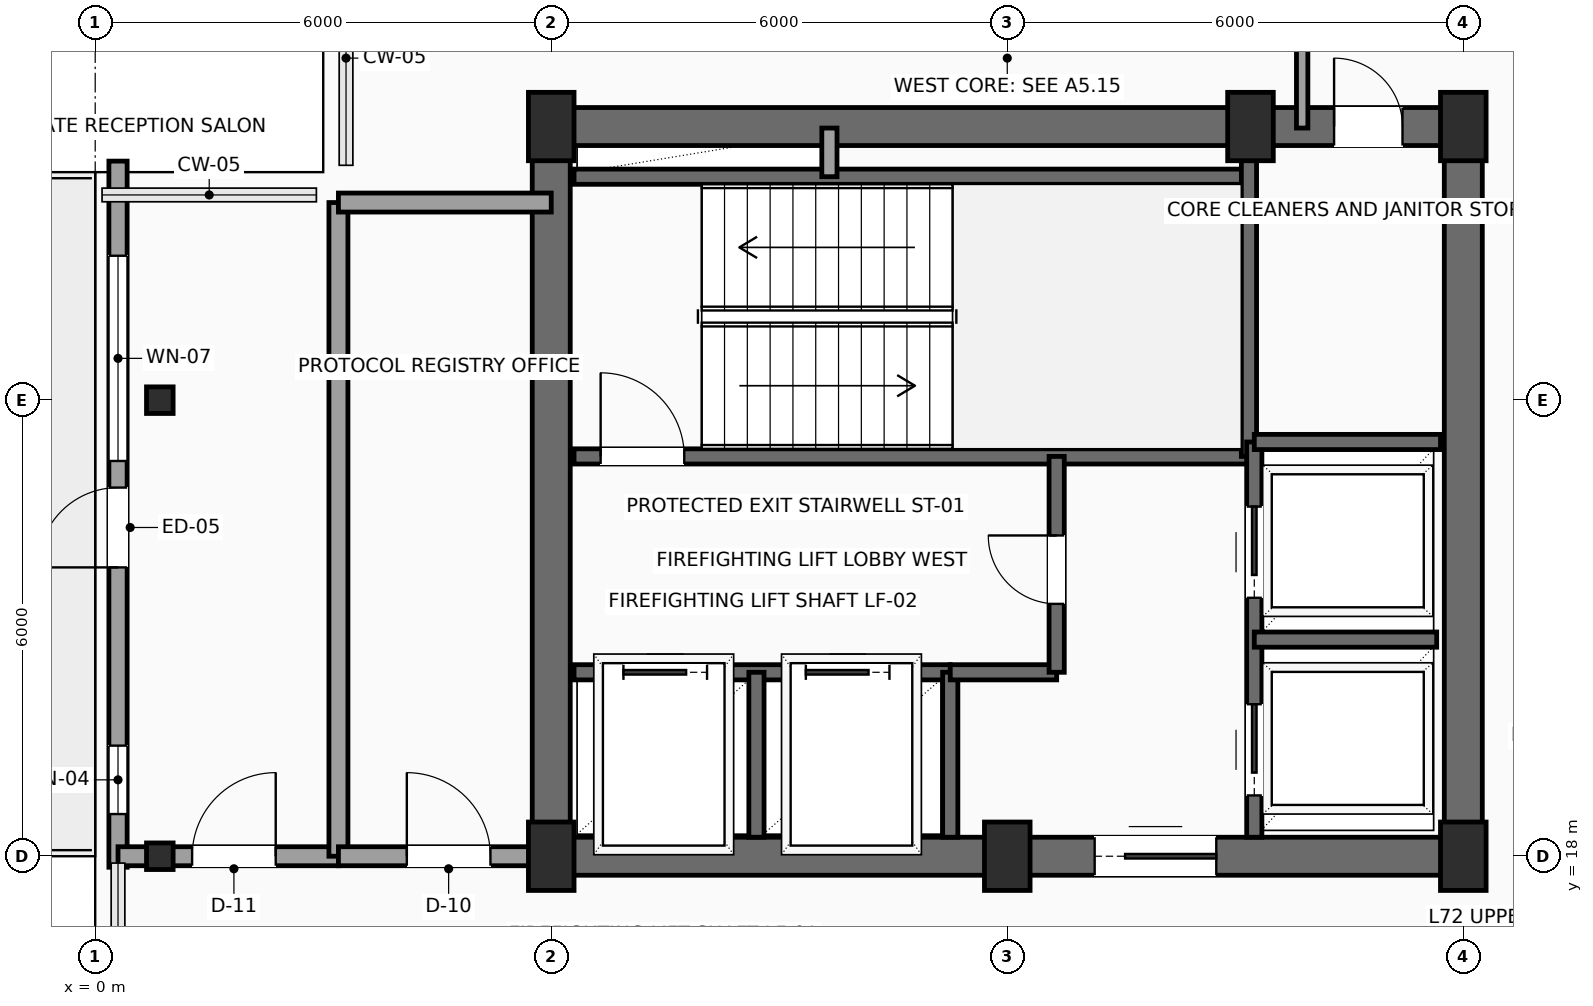
"""IFC4 building model, lengths in metres.
Left out: names, types, materials, properties, quantities, classifications, styles, units other than length and angle.
Written with IfcOpenShell. Run it as: python <this file> out.ifc"""

import sys

from ifc_helpers import new_model, si_unit, direction, frame, frame_2d, origin, origin_2d, place, context, subcontext, project, spatial, rectangle, hollow_rectangle, extrude, element, fill, save


model = new_model("IFC4")
c1 = context("Model", 3, precision=1e-05, world=origin(), true_north=direction((0.0, 1.0)))
c2 = subcontext(c1, "Body", "Model", "MODEL_VIEW")
j1 = project(units=[si_unit("LENGTHUNIT", "METRE"), si_unit("PLANEANGLEUNIT", "RADIAN")], contexts=[c1])
p1 = place(None, origin())
s1 = spatial("IfcSite", under=j1, at=p1, CompositionType="ELEMENT")
p2 = place(p1, origin())
s2 = spatial("IfcBuilding", under=s1, at=p2, CompositionType="ELEMENT")
p3 = place(p2, frame((0.0, 0.0, 285.2)))
s3 = spatial("IfcBuildingStorey", under=s2, at=p3, CompositionType="ELEMENT", Elevation=285.2)
for number, where, z_axis, x_axis in (
    (1, (6.0, 18.0, 0.0), (0.0, 0.0, 1.0), (1.0, 0.0, 0.0)),
    (2, (12.0, 18.0, 0.0), (0.0, 0.0, 1.0), (1.0, 0.0, 0.0)),
    (3, (18.0, 18.0, 0.0), (0.0, 0.0, 1.0), (1.0, 0.0, 0.0)),
    (4, (6.0, 27.6, 0.0), (0.0, 0.0, 1.0), (1.0, 0.0, 0.0)),
    (5, (15.2, 27.6, 0.0), (0.0, 0.0, 1.0), (1.0, 0.0, 0.0)),
    (6, (18.0, 27.6, 0.0), (0.0, 0.0, 1.0), (1.0, 0.0, 0.0)),
):
    element("IfcColumn", number, at=place(p3, frame(where, z_axis=z_axis, x_axis=x_axis)), inside=s3, PredefinedType="COLUMN", context=c2, shape_type="SweptSolid", body=[
        extrude(rectangle(XDim=0.6, YDim=0.9, at=origin_2d()), origin(), (0.0, 0.0, 1.0), 3.5),
    ])
for number, where, z_axis, x_axis in (
    (7, (0.85, 18.0, 0.0), (0.0, 0.0, 1.0), (1.0, 0.0, 0.0)),
    (8, (0.85, 24.0, 0.0), (0.0, 0.0, 1.0), (1.0, 0.0, 0.0)),
):
    element("IfcColumn", number, at=place(p3, frame(where, z_axis=z_axis, x_axis=x_axis)), inside=s3, PredefinedType="COLUMN", context=c2, shape_type="SweptSolid", body=[
        extrude(hollow_rectangle(XDim=0.35, YDim=0.35, WallThickness=0.016, InnerFilletRadius=0.016, OuterFilletRadius=0.032, at=origin_2d()), origin(), (0.0, 0.0, 1.0), 3.5),
    ])
p4 = place(p3, frame((0.3, 17.855, 0.0), z_axis=(0.0, 0.0, 1.0), x_axis=(0.0, 1.0, 0.0)))
e9 = element("IfcWall", 9, at=p4, inside=s3, PredefinedType="SOLIDWALL", context=c2, shape_type="SweptSolid", body=[
    extrude(rectangle(XDim=9.29, YDim=0.24, at=frame_2d((4.645, 0.0))), origin(), (0.0, 0.0, 1.0), 3.3),
])
p5 = place(p4, frame((3.945, 0.0, 0.0)))
e10 = element("IfcOpeningElement", 10, at=p5, cuts=e9, PredefinedType="OPENING", context=c2, shape_type="SweptSolid", body=[
    extrude(rectangle(XDim=1.05, YDim=2.2, at=frame_2d((0.525, 1.1))), frame((0.0, 0.13, 0.0), z_axis=(0.0, -1.0, 0.0), x_axis=(1.0, 0.0, 0.0)), (0.0, 0.0, 1.0), 0.26),
])
p6 = place(p4, frame((5.345, 0.0, 0.6)))
e11 = element("IfcOpeningElement", 11, at=p6, cuts=e9, PredefinedType="OPENING", context=c2, shape_type="SweptSolid", body=[
    extrude(rectangle(XDim=2.7, YDim=2.3, at=frame_2d((1.35, 1.15))), frame((0.0, 0.13, 0.0), z_axis=(0.0, -1.0, 0.0), x_axis=(1.0, 0.0, 0.0)), (0.0, 0.0, 1.0), 0.26),
])
p7 = place(p4, frame((0.7, 0.0, 0.6)))
e12 = element("IfcOpeningElement", 12, at=p7, cuts=e9, PredefinedType="OPENING", context=c2, shape_type="SweptSolid", body=[
    extrude(rectangle(XDim=0.9, YDim=2.2, at=frame_2d((0.45, 1.1))), frame((0.0, 0.13, 0.0), z_axis=(0.0, -1.0, 0.0), x_axis=(1.0, 0.0, 0.0)), (0.0, 0.0, 1.0), 0.26),
])
p8 = place(p3, frame((6.0, 18.0, 0.0), z_axis=(0.0, 0.0, 1.0), x_axis=(1.0, 0.0, 0.0)))
e13 = element("IfcWall", 13, at=p8, inside=s3, PredefinedType="SHEAR", context=c2, shape_type="SweptSolid", body=[
    extrude(rectangle(XDim=12.0, YDim=0.5, at=frame_2d((6.0, 0.0))), origin(), (0.0, 0.0, 1.0), 3.3),
])
p9 = place(p8, frame((7.15, 0.0, 0.0)))
e14 = element("IfcOpeningElement", 14, at=p9, cuts=e13, PredefinedType="OPENING", context=c2, shape_type="SweptSolid", body=[
    extrude(rectangle(XDim=1.6, YDim=2.3, at=frame_2d((0.8, 1.15))), frame((0.0, 0.26, 0.0), z_axis=(0.0, -1.0, 0.0), x_axis=(1.0, 0.0, 0.0)), (0.0, 0.0, 1.0), 0.52),
])
p10 = place(p3, frame((6.0, 27.6, 0.0), z_axis=(0.0, 0.0, 1.0), x_axis=(1.0, 0.0, 0.0)))
e15 = element("IfcWall", 15, at=p10, inside=s3, PredefinedType="SHEAR", context=c2, shape_type="SweptSolid", body=[
    extrude(rectangle(XDim=12.0, YDim=0.5, at=frame_2d((6.0, 0.0))), origin(), (0.0, 0.0, 1.0), 3.3),
])
p11 = place(p10, frame((10.3, 0.0, 0.0)))
e16 = element("IfcOpeningElement", 16, at=p11, cuts=e15, PredefinedType="OPENING", context=c2, shape_type="SweptSolid", body=[
    extrude(rectangle(XDim=0.9, YDim=2.15, at=frame_2d((0.45, 1.075))), frame((0.0, 0.26, 0.0), z_axis=(0.0, -1.0, 0.0), x_axis=(1.0, 0.0, 0.0)), (0.0, 0.0, 1.0), 0.52),
])
for number, where, z_axis, x_axis in (
    (17, (6.0, 18.0, 0.0), (0.0, 0.0, 1.0), (0.0, 1.0, 0.0)),
    (18, (18.0, 18.0, 0.0), (0.0, 0.0, 1.0), (0.0, 1.0, 0.0)),
):
    element("IfcWall", number, at=place(p3, frame(where, z_axis=z_axis, x_axis=x_axis)), inside=s3, PredefinedType="SHEAR", context=c2, shape_type="SweptSolid", body=[
        extrude(rectangle(XDim=9.6, YDim=0.5, at=frame_2d((4.8, 0.0))), origin(), (0.0, 0.0, 1.0), 3.3),
    ])
p12 = place(p3, frame((6.3, 23.26, 0.0), z_axis=(0.0, 0.0, 1.0), x_axis=(1.0, 0.0, 0.0)))
e19 = element("IfcWall", 19, at=p12, inside=s3, PredefinedType="SHEAR", context=c2, shape_type="SweptSolid", body=[
    extrude(rectangle(XDim=8.88, YDim=0.2, at=frame_2d((4.44, 0.0))), origin(), (0.0, 0.0, 1.0), 3.3),
])
p13 = place(p12, frame((0.35, 0.0, 0.0)))
e20 = element("IfcOpeningElement", 20, at=p13, cuts=e19, PredefinedType="OPENING", context=c2, shape_type="SweptSolid", body=[
    extrude(rectangle(XDim=1.1, YDim=2.2, at=frame_2d((0.55, 1.1))), frame((0.0, 0.11, 0.0), z_axis=(0.0, -1.0, 0.0), x_axis=(1.0, 0.0, 0.0)), (0.0, 0.0, 1.0), 0.22),
])
p14 = place(p3, frame((6.3, 26.94, 0.0), z_axis=(0.0, 0.0, 1.0), x_axis=(1.0, 0.0, 0.0)))
e21 = element("IfcWall", 21, at=p14, inside=s3, PredefinedType="SHEAR", context=c2, shape_type="SweptSolid", body=[
    extrude(rectangle(XDim=8.88, YDim=0.2, at=frame_2d((4.44, 0.0))), origin(), (0.0, 0.0, 1.0), 3.3),
])
p15 = place(p3, frame((15.18, 23.26, 0.0), z_axis=(0.0, 0.0, 1.0), x_axis=(0.0, 1.0, 0.0)))
e22 = element("IfcWall", 22, at=p15, inside=s3, PredefinedType="SHEAR", context=c2, shape_type="SweptSolid", body=[
    extrude(rectangle(XDim=4.04, YDim=0.2, at=frame_2d((2.02, 0.0))), origin(), (0.0, 0.0, 1.0), 3.3),
])
p16 = place(p3, frame((6.3, 20.42, 0.0), z_axis=(0.0, 0.0, 1.0), x_axis=(1.0, 0.0, 0.0)))
e23 = element("IfcWall", 23, at=p16, inside=s3, PredefinedType="SHEAR", context=c2, shape_type="SweptSolid", body=[
    extrude(rectangle(XDim=4.95, YDim=0.2, at=frame_2d((2.475, 0.0))), origin(), (0.0, 0.0, 1.0), 3.3),
])
p17 = place(p16, frame((0.65, 0.0, 0.0)))
e24 = element("IfcOpeningElement", 24, at=p17, cuts=e23, PredefinedType="OPENING", context=c2, shape_type="SweptSolid", body=[
    extrude(rectangle(XDim=1.1, YDim=2.2, at=frame_2d((0.55, 1.1))), frame((0.0, 0.11, 0.0), z_axis=(0.0, -1.0, 0.0), x_axis=(1.0, 0.0, 0.0)), (0.0, 0.0, 1.0), 0.22),
])
p18 = place(p16, frame((3.05, 0.0, 0.0)))
e25 = element("IfcOpeningElement", 25, at=p18, cuts=e23, PredefinedType="OPENING", context=c2, shape_type="SweptSolid", body=[
    extrude(rectangle(XDim=1.1, YDim=2.2, at=frame_2d((0.55, 1.1))), frame((0.0, 0.11, 0.0), z_axis=(0.0, -1.0, 0.0), x_axis=(1.0, 0.0, 0.0)), (0.0, 0.0, 1.0), 0.22),
])
for number, where, z_axis, x_axis in (
    (26, (8.7, 18.25, 0.0), (0.0, 0.0, 1.0), (0.0, 1.0, 0.0)),
    (27, (11.25, 18.25, 0.0), (0.0, 0.0, 1.0), (0.0, 1.0, 0.0)),
):
    element("IfcWall", number, at=place(p3, frame(where, z_axis=z_axis, x_axis=x_axis)), inside=s3, PredefinedType="SHEAR", context=c2, shape_type="SweptSolid", body=[
        extrude(rectangle(XDim=2.17, YDim=0.2, at=frame_2d((1.085, 0.0))), origin(), (0.0, 0.0, 1.0), 3.3),
    ])
p19 = place(p3, frame((11.25, 20.42, 0.0), z_axis=(0.0, 0.0, 1.0), x_axis=(1.0, 0.0, 0.0)))
e28 = element("IfcWall", 28, at=p19, inside=s3, PredefinedType="SHEAR", context=c2, shape_type="SweptSolid", body=[
    extrude(rectangle(XDim=1.4, YDim=0.2, at=frame_2d((0.7, 0.0))), origin(), (0.0, 0.0, 1.0), 3.3),
])
p20 = place(p3, frame((12.65, 20.42, 0.0), z_axis=(0.0, 0.0, 1.0), x_axis=(0.0, 1.0, 0.0)))
e29 = element("IfcWall", 29, at=p20, inside=s3, PredefinedType="SHEAR", context=c2, shape_type="SweptSolid", body=[
    extrude(rectangle(XDim=2.84, YDim=0.2, at=frame_2d((1.42, 0.0))), origin(), (0.0, 0.0, 1.0), 3.3),
])
p21 = place(p20, frame((0.9, 0.0, 0.0)))
e30 = element("IfcOpeningElement", 30, at=p21, cuts=e29, PredefinedType="OPENING", context=c2, shape_type="SweptSolid", body=[
    extrude(rectangle(XDim=0.9, YDim=2.15, at=frame_2d((0.45, 1.075))), frame((0.0, 0.11, 0.0), z_axis=(0.0, -1.0, 0.0), x_axis=(1.0, 0.0, 0.0)), (0.0, 0.0, 1.0), 0.22),
])
p22 = place(p3, frame((9.66, 26.94, 0.0), z_axis=(0.0, 0.0, 1.0), x_axis=(0.0, 1.0, 0.0)))
e31 = element("IfcWall", 31, at=p22, inside=s3, PredefinedType="SOLIDWALL", context=c2, shape_type="SweptSolid", body=[
    extrude(rectangle(XDim=0.64, YDim=0.2, at=frame_2d((0.32, 0.0))), origin(), (0.0, 0.0, 1.0), 3.3),
])
p23 = place(p3, frame((15.25, 18.25, 0.0), z_axis=(0.0, 0.0, 1.0), x_axis=(0.0, 1.0, 0.0)))
e32 = element("IfcWall", 32, at=p23, inside=s3, PredefinedType="SHEAR", context=c2, shape_type="SweptSolid", body=[
    extrude(rectangle(XDim=5.2, YDim=0.2, at=frame_2d((2.6, 0.0))), origin(), (0.0, 0.0, 1.0), 3.3),
])
p24 = place(p23, frame((0.55, 0.0, 0.0)))
e33 = element("IfcOpeningElement", 33, at=p24, cuts=e32, PredefinedType="OPENING", context=c2, shape_type="SweptSolid", body=[
    extrude(rectangle(XDim=1.2, YDim=2.2, at=frame_2d((0.6, 1.1))), frame((0.0, 0.11, 0.0), z_axis=(0.0, -1.0, 0.0), x_axis=(1.0, 0.0, 0.0)), (0.0, 0.0, 1.0), 0.22),
])
p25 = place(p23, frame((3.15, 0.0, 0.0)))
e34 = element("IfcOpeningElement", 34, at=p25, cuts=e32, PredefinedType="OPENING", context=c2, shape_type="SweptSolid", body=[
    extrude(rectangle(XDim=1.2, YDim=2.2, at=frame_2d((0.6, 1.1))), frame((0.0, 0.11, 0.0), z_axis=(0.0, -1.0, 0.0), x_axis=(1.0, 0.0, 0.0)), (0.0, 0.0, 1.0), 0.22),
])
p26 = place(p3, frame((15.25, 20.85, 0.0), z_axis=(0.0, 0.0, 1.0), x_axis=(1.0, 0.0, 0.0)))
e35 = element("IfcWall", 35, at=p26, inside=s3, PredefinedType="SHEAR", context=c2, shape_type="SweptSolid", body=[
    extrude(rectangle(XDim=2.4, YDim=0.2, at=frame_2d((1.2, 0.0))), origin(), (0.0, 0.0, 1.0), 3.3),
])
p27 = place(p3, frame((15.25, 23.45, 0.0), z_axis=(0.0, 0.0, 1.0), x_axis=(1.0, 0.0, 0.0)))
e36 = element("IfcWall", 36, at=p27, inside=s3, PredefinedType="SHEAR", context=c2, shape_type="SweptSolid", body=[
    extrude(rectangle(XDim=2.45, YDim=0.2, at=frame_2d((1.225, 0.0))), origin(), (0.0, 0.0, 1.0), 3.3),
])
p28 = place(p3, frame((15.88, 27.58, 0.0), z_axis=(0.0, 0.0, 1.0), x_axis=(0.0, 1.0, 0.0)))
e37 = element("IfcWall", 37, at=p28, inside=s3, PredefinedType="PARTITIONING", context=c2, shape_type="SweptSolid", body=[
    extrude(rectangle(XDim=2.12, YDim=0.15, at=frame_2d((1.06, 0.0))), origin(), (0.0, 0.0, 1.0), 3.3),
])
p29 = place(p3, frame((0.3, 18.0, 0.0), z_axis=(0.0, 0.0, 1.0), x_axis=(1.0, 0.0, 0.0)))
e38 = element("IfcWall", 38, at=p29, inside=s3, PredefinedType="PARTITIONING", context=c2, shape_type="SweptSolid", body=[
    extrude(rectangle(XDim=2.9, YDim=0.25, at=frame_2d((1.45, 0.0))), origin(), (0.0, 0.0, 1.0), 2.967),
])
p30 = place(p29, frame((0.975, 0.0, 0.0)))
e39 = element("IfcOpeningElement", 39, at=p30, cuts=e38, PredefinedType="OPENING", context=c2, shape_type="SweptSolid", body=[
    extrude(rectangle(XDim=1.1, YDim=2.25, at=frame_2d((0.55, 1.125))), frame((0.0, 0.135, 0.0), z_axis=(0.0, -1.0, 0.0), x_axis=(1.0, 0.0, 0.0)), (0.0, 0.0, 1.0), 0.27),
])
p31 = place(p3, frame((3.2, 18.0, 0.0), z_axis=(0.0, 0.0, 1.0), x_axis=(0.0, 1.0, 0.0)))
e40 = element("IfcWall", 40, at=p31, inside=s3, PredefinedType="PARTITIONING", context=c2, shape_type="SweptSolid", body=[
    extrude(rectangle(XDim=8.6, YDim=0.25, at=frame_2d((4.3, 0.0))), origin(), (0.0, 0.0, 1.0), 3.3),
])
p32 = place(p3, frame((3.2, 18.0, 0.0), z_axis=(0.0, 0.0, 1.0), x_axis=(1.0, 0.0, 0.0)))
e41 = element("IfcWall", 41, at=p32, inside=s3, PredefinedType="PARTITIONING", context=c2, shape_type="SweptSolid", body=[
    extrude(rectangle(XDim=2.8, YDim=0.25, at=frame_2d((1.4, 0.0))), origin(), (0.0, 0.0, 1.0), 2.992),
])
p33 = place(p32, frame((0.9, 0.0, 0.0)))
e42 = element("IfcOpeningElement", 42, at=p33, cuts=e41, PredefinedType="OPENING", context=c2, shape_type="SweptSolid", body=[
    extrude(rectangle(XDim=1.1, YDim=2.25, at=frame_2d((0.55, 1.125))), frame((0.0, 0.135, 0.0), z_axis=(0.0, -1.0, 0.0), x_axis=(1.0, 0.0, 0.0)), (0.0, 0.0, 1.0), 0.27),
])
p34 = place(p3, frame((3.2, 26.6, 0.0), z_axis=(0.0, 0.0, 1.0), x_axis=(1.0, 0.0, 0.0)))
e43 = element("IfcWall", 43, at=p34, inside=s3, PredefinedType="PARTITIONING", context=c2, shape_type="SweptSolid", body=[
    extrude(rectangle(XDim=2.8, YDim=0.25, at=frame_2d((1.4, 0.0))), origin(), (0.0, 0.0, 1.0), 3.3),
])
p35 = place(p5, origin())
e44 = element("IfcDoor", 44, at=p35, inside=s3, OperationType="SINGLE_SWING_LEFT", PredefinedType="DOOR", context=c2, shape_type="SweptSolid", body=[
    extrude(rectangle(XDim=1.05, YDim=2.2, at=frame_2d((0.525, 1.1))), frame((0.0, 0.025, 0.0), z_axis=(0.0, -1.0, 0.0), x_axis=(1.0, 0.0, 0.0)), (0.0, 0.0, 1.0), 0.05),
])
fill(e10, e44)
p36 = place(p6, origin())
e45 = element("IfcWindow", 45, at=p36, inside=s3, PartitioningType="SINGLE_PANEL", PredefinedType="WINDOW", context=c2, shape_type="SweptSolid", body=[
    extrude(rectangle(XDim=2.7, YDim=2.3, at=frame_2d((1.35, 1.15))), frame((0.0, 0.03, 0.0), z_axis=(0.0, -1.0, 0.0), x_axis=(1.0, 0.0, 0.0)), (0.0, 0.0, 1.0), 0.06),
])
fill(e11, e45)
p37 = place(p7, origin())
e46 = element("IfcWindow", 46, at=p37, inside=s3, PartitioningType="SINGLE_PANEL", PredefinedType="WINDOW", context=c2, shape_type="SweptSolid", body=[
    extrude(rectangle(XDim=0.9, YDim=2.2, at=frame_2d((0.45, 1.1))), frame((0.0, 0.03, 0.0), z_axis=(0.0, -1.0, 0.0), x_axis=(1.0, 0.0, 0.0)), (0.0, 0.0, 1.0), 0.06),
])
fill(e12, e46)
p38 = place(p9, origin())
e47 = element("IfcDoor", 47, at=p38, inside=s3, OperationType="DOUBLE_DOOR_SLIDING", PredefinedType="DOOR", context=c2, shape_type="SweptSolid", body=[
    extrude(rectangle(XDim=1.6, YDim=2.3, at=frame_2d((0.8, 1.15))), frame((0.0, 0.025, 0.0), z_axis=(0.0, -1.0, 0.0), x_axis=(1.0, 0.0, 0.0)), (0.0, 0.0, 1.0), 0.05),
])
fill(e14, e47)
p39 = place(p11, origin())
e48 = element("IfcDoor", 48, at=p39, inside=s3, OperationType="SINGLE_SWING_LEFT", PredefinedType="DOOR", context=c2, shape_type="SweptSolid", body=[
    extrude(rectangle(XDim=0.9, YDim=2.15, at=frame_2d((0.45, 1.075))), frame((0.0, 0.025, 0.0), z_axis=(0.0, -1.0, 0.0), x_axis=(1.0, 0.0, 0.0)), (0.0, 0.0, 1.0), 0.05),
])
fill(e16, e48)
p40 = place(p13, origin())
e49 = element("IfcDoor", 49, at=p40, inside=s3, OperationType="SINGLE_SWING_LEFT", PredefinedType="DOOR", context=c2, shape_type="SweptSolid", body=[
    extrude(rectangle(XDim=1.1, YDim=2.2, at=frame_2d((0.55, 1.1))), frame((0.0, 0.025, 0.0), z_axis=(0.0, -1.0, 0.0), x_axis=(1.0, 0.0, 0.0)), (0.0, 0.0, 1.0), 0.05),
])
fill(e20, e49)
p41 = place(p17, origin())
e50 = element("IfcDoor", 50, at=p41, inside=s3, OperationType="SLIDING_TO_LEFT", PredefinedType="DOOR", context=c2, shape_type="SweptSolid", body=[
    extrude(rectangle(XDim=1.1, YDim=2.2, at=frame_2d((0.55, 1.1))), frame((0.0, 0.025, 0.0), z_axis=(0.0, -1.0, 0.0), x_axis=(1.0, 0.0, 0.0)), (0.0, 0.0, 1.0), 0.05),
])
fill(e24, e50)
p42 = place(p18, origin())
e51 = element("IfcDoor", 51, at=p42, inside=s3, OperationType="SLIDING_TO_LEFT", PredefinedType="DOOR", context=c2, shape_type="SweptSolid", body=[
    extrude(rectangle(XDim=1.1, YDim=2.2, at=frame_2d((0.55, 1.1))), frame((0.0, 0.025, 0.0), z_axis=(0.0, -1.0, 0.0), x_axis=(1.0, 0.0, 0.0)), (0.0, 0.0, 1.0), 0.05),
])
fill(e25, e51)
p43 = place(p21, origin())
e52 = element("IfcDoor", 52, at=p43, inside=s3, OperationType="SINGLE_SWING_RIGHT", PredefinedType="DOOR", context=c2, shape_type="SweptSolid", body=[
    extrude(rectangle(XDim=0.9, YDim=2.15, at=frame_2d((0.45, 1.075))), frame((0.0, 0.025, 0.0), z_axis=(0.0, -1.0, 0.0), x_axis=(1.0, 0.0, 0.0)), (0.0, 0.0, 1.0), 0.05),
])
fill(e30, e52)
p44 = place(p24, origin())
e53 = element("IfcDoor", 53, at=p44, inside=s3, OperationType="SLIDING_TO_RIGHT", PredefinedType="DOOR", context=c2, shape_type="SweptSolid", body=[
    extrude(rectangle(XDim=1.2, YDim=2.2, at=frame_2d((0.6, 1.1))), frame((0.0, 0.025, 0.0), z_axis=(0.0, -1.0, 0.0), x_axis=(1.0, 0.0, 0.0)), (0.0, 0.0, 1.0), 0.05),
])
fill(e33, e53)
p45 = place(p25, origin())
e54 = element("IfcDoor", 54, at=p45, inside=s3, OperationType="SLIDING_TO_RIGHT", PredefinedType="DOOR", context=c2, shape_type="SweptSolid", body=[
    extrude(rectangle(XDim=1.2, YDim=2.2, at=frame_2d((0.6, 1.1))), frame((0.0, 0.025, 0.0), z_axis=(0.0, -1.0, 0.0), x_axis=(1.0, 0.0, 0.0)), (0.0, 0.0, 1.0), 0.05),
])
fill(e34, e54)
p46 = place(p30, origin())
e55 = element("IfcDoor", 55, at=p46, inside=s3, OperationType="SINGLE_SWING_RIGHT", PredefinedType="DOOR", context=c2, shape_type="SweptSolid", body=[
    extrude(rectangle(XDim=1.1, YDim=2.25, at=frame_2d((0.55, 1.125))), frame((0.0, 0.025, 0.0), z_axis=(0.0, -1.0, 0.0), x_axis=(1.0, 0.0, 0.0)), (0.0, 0.0, 1.0), 0.05),
])
fill(e39, e55)
p47 = place(p33, origin())
e56 = element("IfcDoor", 56, at=p47, inside=s3, OperationType="SINGLE_SWING_LEFT", PredefinedType="DOOR", context=c2, shape_type="SweptSolid", body=[
    extrude(rectangle(XDim=1.1, YDim=2.25, at=frame_2d((0.55, 1.125))), frame((0.0, 0.025, 0.0), z_axis=(0.0, -1.0, 0.0), x_axis=(1.0, 0.0, 0.0)), (0.0, 0.0, 1.0), 0.05),
])
fill(e42, e56)
save(model, sys.argv[1])
